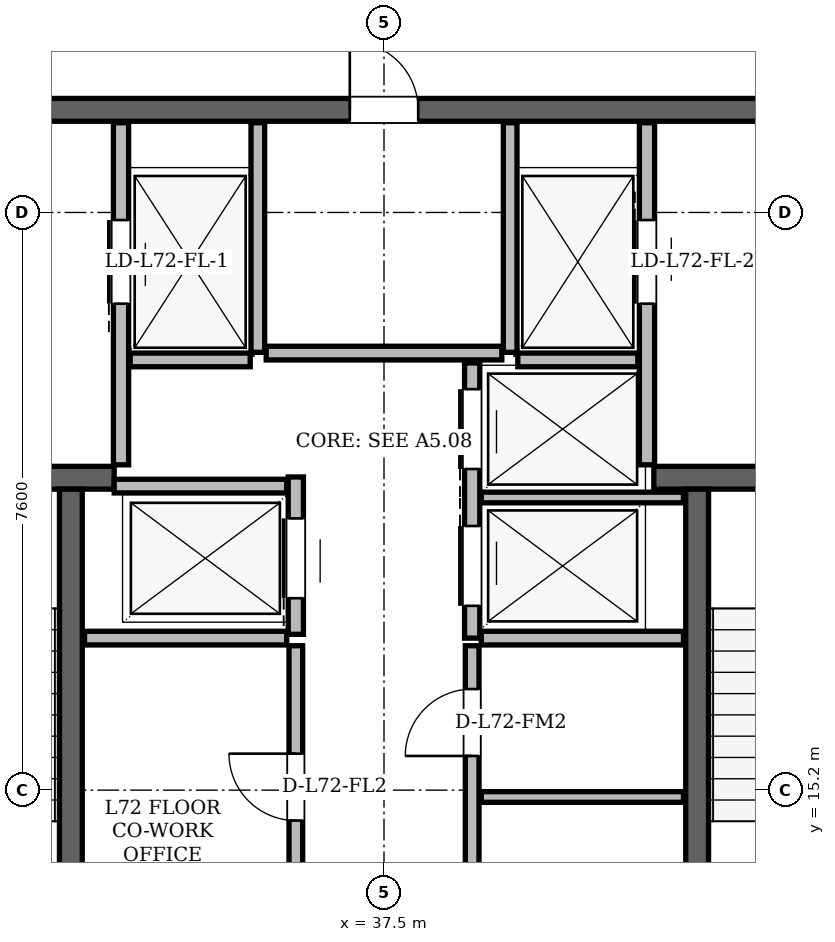
"""IFC4 building model, lengths in metres.
Left out: names, types, materials, properties, quantities, classifications, styles, units other than length and angle.
Written with IfcOpenShell. Run it as: python <this file> out.ifc"""

import sys

from ifc_helpers import new_model, si_unit, direction, frame, frame_2d, origin, place, context, subcontext, project, spatial, rectangle, extrude, element, fill, save


model = new_model("IFC4")
c1 = context("Model", 3, precision=1e-05, world=origin(), true_north=direction((0.0, 1.0)))
c2 = subcontext(c1, "Body", "Model", "MODEL_VIEW")
j1 = project(units=[si_unit("LENGTHUNIT", "METRE"), si_unit("PLANEANGLEUNIT", "RADIAN")], contexts=[c1])
p1 = place(None, origin())
s1 = spatial("IfcSite", under=j1, at=p1, CompositionType="ELEMENT")
p2 = place(p1, origin())
s2 = spatial("IfcBuilding", under=s1, at=p2, CompositionType="ELEMENT")
p3 = place(p2, frame((0.0, 0.0, 273.3)))
s3 = spatial("IfcBuildingStorey", under=s2, at=p3, CompositionType="ELEMENT", Elevation=273.3)
p4 = place(p3, frame((29.65, 24.15, 0.0), z_axis=(0.0, 0.0, 1.0), x_axis=(1.0, 0.0, 0.0)))
e1 = element("IfcWall", 1, at=p4, inside=s3, PredefinedType="SHEAR", context=c2, shape_type="SweptSolid", body=[
    extrude(rectangle(XDim=15.7, YDim=0.3, at=frame_2d((7.85, 0.0))), origin(), (0.0, 0.0, 1.0), 3.68),
])
p5 = place(p4, frame((1.7, 0.0, 0.0)))
e2 = element("IfcOpeningElement", 2, at=p5, cuts=e1, PredefinedType="OPENING", context=c2, shape_type="SweptSolid", body=[
    extrude(rectangle(XDim=1.2, YDim=2.2, at=frame_2d((0.6, 1.1))), frame((0.0, 0.15, 0.0), z_axis=(0.0, -1.0, 0.0), x_axis=(1.0, 0.0, 0.0)), (0.0, 0.0, 1.0), 0.3),
])
p6 = place(p4, frame((12.8, 0.0, 0.0)))
e3 = element("IfcOpeningElement", 3, at=p6, cuts=e1, PredefinedType="OPENING", context=c2, shape_type="SweptSolid", body=[
    extrude(rectangle(XDim=1.2, YDim=2.2, at=frame_2d((0.6, 1.1))), frame((0.0, 0.15, 0.0), z_axis=(0.0, -1.0, 0.0), x_axis=(1.0, 0.0, 0.0)), (0.0, 0.0, 1.0), 0.3),
])
p7 = place(p4, frame((7.4, 0.0, 0.0)))
e4 = element("IfcOpeningElement", 4, at=p7, cuts=e1, PredefinedType="OPENING", context=c2, shape_type="SweptSolid", body=[
    extrude(rectangle(XDim=0.9, YDim=2.05, at=frame_2d((0.45, 1.025))), frame((0.0, 0.15, 0.0), z_axis=(0.0, -1.0, 0.0), x_axis=(1.0, 0.0, 0.0)), (0.0, 0.0, 1.0), 0.3),
])
p8 = place(p3, frame((29.94, 19.31, 0.0), z_axis=(0.0, 0.0, 1.0), x_axis=(1.0, 0.0, 0.0)))
e5 = element("IfcWall", 5, at=p8, inside=s3, PredefinedType="SHEAR", context=c2, shape_type="SweptSolid", body=[
    extrude(rectangle(XDim=4.01, YDim=0.3, at=frame_2d((2.005, 0.0))), origin(), (0.0, 0.0, 1.0), 3.68),
])
p9 = place(p8, frame((1.01, 0.0, 0.0)))
e6 = element("IfcOpeningElement", 6, at=p9, cuts=e5, PredefinedType="OPENING", context=c2, shape_type="SweptSolid", body=[
    extrude(rectangle(XDim=1.4, YDim=2.2, at=frame_2d((0.7, 1.1))), frame((0.0, 0.15, 0.0), z_axis=(0.0, -1.0, 0.0), x_axis=(1.0, 0.0, 0.0)), (0.0, 0.0, 1.0), 0.3),
])
p10 = place(p3, frame((41.05, 19.31, 0.0), z_axis=(0.0, 0.0, 1.0), x_axis=(1.0, 0.0, 0.0)))
e7 = element("IfcWall", 7, at=p10, inside=s3, PredefinedType="SHEAR", context=c2, shape_type="SweptSolid", body=[
    extrude(rectangle(XDim=4.01, YDim=0.3, at=frame_2d((2.005, 0.0))), origin(), (0.0, 0.0, 1.0), 3.68),
])
p11 = place(p10, frame((1.6, 0.0, 0.0)))
e8 = element("IfcOpeningElement", 8, at=p11, cuts=e7, PredefinedType="OPENING", context=c2, shape_type="SweptSolid", body=[
    extrude(rectangle(XDim=1.4, YDim=2.2, at=frame_2d((0.7, 1.1))), frame((0.0, 0.15, 0.0), z_axis=(0.0, -1.0, 0.0), x_axis=(1.0, 0.0, 0.0)), (0.0, 0.0, 1.0), 0.3),
])
for number, where, z_axis, x_axis in (
    (9, (33.38, 11.54, 0.0), (0.0, 0.0, 1.0), (0.0, 1.0, 0.0)),
    (10, (41.62, 11.54, 0.0), (0.0, 0.0, 1.0), (0.0, 1.0, 0.0)),
):
    element("IfcWall", number, at=place(p3, frame(where, z_axis=z_axis, x_axis=x_axis)), inside=s3, PredefinedType="SHEAR", context=c2, shape_type="SweptSolid", body=[
        extrude(rectangle(XDim=7.62, YDim=0.3, at=frame_2d((3.81, 0.0))), origin(), (0.0, 0.0, 1.0), 3.68),
    ])
p12 = place(p3, frame((58.532, 10.683, 0.0), z_axis=(0.0, 0.0, 1.0), x_axis=(-0.499999381892, 0.866025760649, 0.0)))
e11 = element("IfcWall", 11, at=p12, inside=s3, PredefinedType="SOLIDWALL", context=c2, shape_type="SweptSolid", body=[
    extrude(rectangle(XDim=37.343, YDim=0.29, at=frame_2d((18.671, 0.0))), origin(), (0.0, 0.0, 1.0), 3.058),
])
p13 = place(p12, frame((6.789, 0.0, 0.0)))
e12 = element("IfcOpeningElement", 12, at=p13, cuts=e11, PredefinedType="OPENING", context=c2, shape_type="SweptSolid", body=[
    extrude(rectangle(XDim=1.5, YDim=2.2, at=frame_2d((0.75, 1.1))), frame((0.0, 0.145, 0.0), z_axis=(0.0, -1.0, 0.0), x_axis=(1.0, 0.0, 0.0)), (0.0, 0.0, 1.0), 0.29),
])
p14 = place(p12, frame((27.808, 0.0, 0.0)))
e13 = element("IfcOpeningElement", 13, at=p14, cuts=e11, PredefinedType="OPENING", context=c2, shape_type="SweptSolid", body=[
    extrude(rectangle(XDim=1.5, YDim=2.2, at=frame_2d((0.75, 1.1))), frame((0.0, 0.145, 0.0), z_axis=(0.0, -1.0, 0.0), x_axis=(1.0, 0.0, 0.0)), (0.0, 0.0, 1.0), 0.29),
])
p15 = place(p12, frame((0.901, 0.0, 0.85)))
e14 = element("IfcOpeningElement", 14, at=p15, cuts=e11, PredefinedType="OPENING", context=c2, shape_type="SweptSolid", body=[
    extrude(rectangle(XDim=1.2, YDim=1.48, at=frame_2d((0.6, 0.74))), frame((0.0, 0.145, 0.0), z_axis=(0.0, -1.0, 0.0), x_axis=(1.0, 0.0, 0.0)), (0.0, 0.0, 1.0), 0.29),
])
p16 = place(p12, frame((12.688, 0.0, 0.85)))
e15 = element("IfcOpeningElement", 15, at=p16, cuts=e11, PredefinedType="OPENING", context=c2, shape_type="SweptSolid", body=[
    extrude(rectangle(XDim=3.0, YDim=2.098, at=frame_2d((1.5, 1.049))), frame((0.0, 0.145, 0.0), z_axis=(0.0, -1.0, 0.0), x_axis=(1.0, 0.0, 0.0)), (0.0, 0.0, 1.0), 0.29),
])
p17 = place(p12, frame((17.814, 0.0, 0.85)))
e16 = element("IfcOpeningElement", 16, at=p17, cuts=e11, PredefinedType="OPENING", context=c2, shape_type="SweptSolid", body=[
    extrude(rectangle(XDim=2.6, YDim=1.95, at=frame_2d((1.3, 0.975))), frame((0.0, 0.145, 0.0), z_axis=(0.0, -1.0, 0.0), x_axis=(1.0, 0.0, 0.0)), (0.0, 0.0, 1.0), 0.29),
])
p18 = place(p12, frame((35.362, 0.0, 0.85)))
e17 = element("IfcOpeningElement", 17, at=p18, cuts=e11, PredefinedType="OPENING", context=c2, shape_type="SweptSolid", body=[
    extrude(rectangle(XDim=1.2, YDim=1.48, at=frame_2d((0.6, 0.74))), frame((0.0, 0.145, 0.0), z_axis=(0.0, -1.0, 0.0), x_axis=(1.0, 0.0, 0.0)), (0.0, 0.0, 1.0), 0.29),
])
p19 = place(p12, frame((33.788, 0.0, 0.85)))
e18 = element("IfcOpeningElement", 18, at=p19, cuts=e11, PredefinedType="OPENING", context=c2, shape_type="SweptSolid", body=[
    extrude(rectangle(XDim=1.2, YDim=1.48, at=frame_2d((0.6, 0.74))), frame((0.0, 0.145, 0.0), z_axis=(0.0, -1.0, 0.0), x_axis=(1.0, 0.0, 0.0)), (0.0, 0.0, 1.0), 0.29),
])
p20 = place(p12, frame((22.74, 0.0, 0.85)))
e19 = element("IfcOpeningElement", 19, at=p20, cuts=e11, PredefinedType="OPENING", context=c2, shape_type="SweptSolid", body=[
    extrude(rectangle(XDim=1.2, YDim=1.48, at=frame_2d((0.6, 0.74))), frame((0.0, 0.145, 0.0), z_axis=(0.0, -1.0, 0.0), x_axis=(1.0, 0.0, 0.0)), (0.0, 0.0, 1.0), 0.29),
])
p21 = place(p12, frame((31.705, 0.0, 0.85)))
e20 = element("IfcOpeningElement", 20, at=p21, cuts=e11, PredefinedType="OPENING", context=c2, shape_type="SweptSolid", body=[
    extrude(rectangle(XDim=1.2, YDim=1.48, at=frame_2d((0.6, 0.74))), frame((0.0, 0.145, 0.0), z_axis=(0.0, -1.0, 0.0), x_axis=(1.0, 0.0, 0.0)), (0.0, 0.0, 1.0), 0.29),
])
p22 = place(p3, frame((35.139, 43.023, 0.0), z_axis=(0.0, 0.0, 1.0), x_axis=(-0.499999381892, -0.866025760649, 0.0)))
e21 = element("IfcWall", 21, at=p22, inside=s3, PredefinedType="SOLIDWALL", context=c2, shape_type="SweptSolid", body=[
    extrude(rectangle(XDim=37.343, YDim=0.29, at=frame_2d((18.671, 0.0))), origin(), (0.0, 0.0, 1.0), 3.058),
])
p23 = place(p22, frame((3.639, 0.0, 0.0)))
e22 = element("IfcOpeningElement", 22, at=p23, cuts=e21, PredefinedType="OPENING", context=c2, shape_type="SweptSolid", body=[
    extrude(rectangle(XDim=1.5, YDim=2.2, at=frame_2d((0.75, 1.1))), frame((0.0, 0.145, 0.0), z_axis=(0.0, -1.0, 0.0), x_axis=(1.0, 0.0, 0.0)), (0.0, 0.0, 1.0), 0.29),
])
p24 = place(p22, frame((27.809, 0.0, 0.0)))
e23 = element("IfcOpeningElement", 23, at=p24, cuts=e21, PredefinedType="OPENING", context=c2, shape_type="SweptSolid", body=[
    extrude(rectangle(XDim=1.5, YDim=2.2, at=frame_2d((0.75, 1.1))), frame((0.0, 0.145, 0.0), z_axis=(0.0, -1.0, 0.0), x_axis=(1.0, 0.0, 0.0)), (0.0, 0.0, 1.0), 0.29),
])
p25 = place(p22, frame((22.281, 0.0, 0.85)))
e24 = element("IfcOpeningElement", 24, at=p25, cuts=e21, PredefinedType="OPENING", context=c2, shape_type="SweptSolid", body=[
    extrude(rectangle(XDim=2.6, YDim=1.95, at=frame_2d((1.3, 0.975))), frame((0.0, 0.145, 0.0), z_axis=(0.0, -1.0, 0.0), x_axis=(1.0, 0.0, 0.0)), (0.0, 0.0, 1.0), 0.29),
])
p26 = place(p22, frame((33.866, 0.0, 0.85)))
e25 = element("IfcOpeningElement", 25, at=p26, cuts=e21, PredefinedType="OPENING", context=c2, shape_type="SweptSolid", body=[
    extrude(rectangle(XDim=2.4, YDim=1.9, at=frame_2d((1.2, 0.95))), frame((0.0, 0.145, 0.0), z_axis=(0.0, -1.0, 0.0), x_axis=(1.0, 0.0, 0.0)), (0.0, 0.0, 1.0), 0.29),
])
p27 = place(p22, frame((12.197, 0.0, 0.85)))
e26 = element("IfcOpeningElement", 26, at=p27, cuts=e21, PredefinedType="OPENING", context=c2, shape_type="SweptSolid", body=[
    extrude(rectangle(XDim=1.2, YDim=1.48, at=frame_2d((0.6, 0.74))), frame((0.0, 0.145, 0.0), z_axis=(0.0, -1.0, 0.0), x_axis=(1.0, 0.0, 0.0)), (0.0, 0.0, 1.0), 0.29),
])
p28 = place(p22, frame((16.635, 0.0, 0.85)))
e27 = element("IfcOpeningElement", 27, at=p28, cuts=e21, PredefinedType="OPENING", context=c2, shape_type="SweptSolid", body=[
    extrude(rectangle(XDim=1.6, YDim=1.7, at=frame_2d((0.8, 0.85))), frame((0.0, 0.145, 0.0), z_axis=(0.0, -1.0, 0.0), x_axis=(1.0, 0.0, 0.0)), (0.0, 0.0, 1.0), 0.29),
])
p29 = place(p22, frame((7.001, 0.0, 0.85)))
e28 = element("IfcOpeningElement", 28, at=p29, cuts=e21, PredefinedType="OPENING", context=c2, shape_type="SweptSolid", body=[
    extrude(rectangle(XDim=1.2, YDim=1.48, at=frame_2d((0.6, 0.74))), frame((0.0, 0.145, 0.0), z_axis=(0.0, -1.0, 0.0), x_axis=(1.0, 0.0, 0.0)), (0.0, 0.0, 1.0), 0.29),
])
p30 = place(p3, frame((34.04, 19.48, 0.0), z_axis=(0.0, 0.0, 1.0), x_axis=(0.0, 1.0, 0.0)))
e29 = element("IfcWall", 29, at=p30, inside=s3, PredefinedType="PARTITIONING", context=c2, shape_type="SweptSolid", body=[
    extrude(rectangle(XDim=4.5, YDim=0.2, at=frame_2d((2.25, 0.0))), origin(), (0.0, 0.0, 1.0), 3.68),
])
p31 = place(p30, frame((2.12, 0.0, 0.0)))
e30 = element("IfcOpeningElement", 30, at=p31, cuts=e29, PredefinedType="OPENING", context=c2, shape_type="SweptSolid", body=[
    extrude(rectangle(XDim=1.1, YDim=2.2, at=frame_2d((0.55, 1.1))), frame((0.0, 0.1, 0.0), z_axis=(0.0, -1.0, 0.0), x_axis=(1.0, 0.0, 0.0)), (0.0, 0.0, 1.0), 0.2),
])
p32 = place(p3, frame((35.84, 20.96, 0.0), z_axis=(0.0, 0.0, 1.0), x_axis=(0.0, 1.0, 0.0)))
e31 = element("IfcWall", 31, at=p32, inside=s3, PredefinedType="PARTITIONING", context=c2, shape_type="SweptSolid", body=[
    extrude(rectangle(XDim=3.02, YDim=0.18, at=frame_2d((1.51, 0.0))), origin(), (0.0, 0.0, 1.0), 3.68),
])
p33 = place(p3, frame((34.16, 20.86, 0.0), z_axis=(0.0, 0.0, 1.0), x_axis=(1.0, 0.0, 0.0)))
e32 = element("IfcWall", 32, at=p33, inside=s3, PredefinedType="PARTITIONING", context=c2, shape_type="SweptSolid", body=[
    extrude(rectangle(XDim=1.58, YDim=0.18, at=frame_2d((0.79, 0.0))), origin(), (0.0, 0.0, 1.0), 3.68),
])
p34 = place(p3, frame((40.96, 19.48, 0.0), z_axis=(0.0, 0.0, 1.0), x_axis=(0.0, 1.0, 0.0)))
e33 = element("IfcWall", 33, at=p34, inside=s3, PredefinedType="PARTITIONING", context=c2, shape_type="SweptSolid", body=[
    extrude(rectangle(XDim=4.5, YDim=0.2, at=frame_2d((2.25, 0.0))), origin(), (0.0, 0.0, 1.0), 3.68),
])
p35 = place(p34, frame((2.12, 0.0, 0.0)))
e34 = element("IfcOpeningElement", 34, at=p35, cuts=e33, PredefinedType="OPENING", context=c2, shape_type="SweptSolid", body=[
    extrude(rectangle(XDim=1.1, YDim=2.2, at=frame_2d((0.55, 1.1))), frame((0.0, 0.1, 0.0), z_axis=(0.0, -1.0, 0.0), x_axis=(1.0, 0.0, 0.0)), (0.0, 0.0, 1.0), 0.2),
])
p36 = place(p3, frame((39.16, 20.96, 0.0), z_axis=(0.0, 0.0, 1.0), x_axis=(0.0, 1.0, 0.0)))
e35 = element("IfcWall", 35, at=p36, inside=s3, PredefinedType="PARTITIONING", context=c2, shape_type="SweptSolid", body=[
    extrude(rectangle(XDim=3.02, YDim=0.18, at=frame_2d((1.51, 0.0))), origin(), (0.0, 0.0, 1.0), 3.68),
])
p37 = place(p3, frame((39.26, 20.86, 0.0), z_axis=(0.0, 0.0, 1.0), x_axis=(1.0, 0.0, 0.0)))
e36 = element("IfcWall", 36, at=p37, inside=s3, PredefinedType="PARTITIONING", context=c2, shape_type="SweptSolid", body=[
    extrude(rectangle(XDim=1.58, YDim=0.18, at=frame_2d((0.79, 0.0))), origin(), (0.0, 0.0, 1.0), 3.68),
])
p38 = place(p3, frame((36.34, 17.25, 0.0), z_axis=(0.0, 0.0, 1.0), x_axis=(0.0, 1.0, 0.0)))
e37 = element("IfcWall", 37, at=p38, inside=s3, PredefinedType="PARTITIONING", context=c2, shape_type="SweptSolid", body=[
    extrude(rectangle(XDim=2.07, YDim=0.2, at=frame_2d((1.035, 0.0))), origin(), (0.0, 0.0, 1.0), 3.68),
])
p39 = place(p38, frame((0.475, 0.0, 0.0)))
e38 = element("IfcOpeningElement", 38, at=p39, cuts=e37, PredefinedType="OPENING", context=c2, shape_type="SweptSolid", body=[
    extrude(rectangle(XDim=1.05, YDim=2.15, at=frame_2d((0.525, 1.075))), frame((0.0, 0.1, 0.0), z_axis=(0.0, -1.0, 0.0), x_axis=(1.0, 0.0, 0.0)), (0.0, 0.0, 1.0), 0.2),
])
p40 = place(p3, frame((33.95, 19.2, 0.0), z_axis=(0.0, 0.0, 1.0), x_axis=(1.0, 0.0, 0.0)))
e39 = element("IfcWall", 39, at=p40, inside=s3, PredefinedType="PARTITIONING", context=c2, shape_type="SweptSolid", body=[
    extrude(rectangle(XDim=2.27, YDim=0.18, at=frame_2d((1.135, 0.0))), origin(), (0.0, 0.0, 1.0), 3.68),
])
p41 = place(p3, frame((33.56, 17.2, 0.0), z_axis=(0.0, 0.0, 1.0), x_axis=(1.0, 0.0, 0.0)))
e40 = element("IfcWall", 40, at=p41, inside=s3, PredefinedType="PARTITIONING", context=c2, shape_type="SweptSolid", body=[
    extrude(rectangle(XDim=2.66, YDim=0.18, at=frame_2d((1.33, 0.0))), origin(), (0.0, 0.0, 1.0), 3.68),
])
p42 = place(p3, frame((36.34, 11.55, 0.0), z_axis=(0.0, 0.0, 1.0), x_axis=(0.0, 1.0, 0.0)))
e41 = element("IfcWall", 41, at=p42, inside=s3, PredefinedType="PARTITIONING", context=c2, shape_type="SweptSolid", body=[
    extrude(rectangle(XDim=5.55, YDim=0.18, at=frame_2d((2.775, 0.0))), origin(), (0.0, 0.0, 1.0), 3.68),
])
p43 = place(p42, frame((0.55, 0.0, 0.0)))
e42 = element("IfcOpeningElement", 42, at=p43, cuts=e41, PredefinedType="OPENING", context=c2, shape_type="SweptSolid", body=[
    extrude(rectangle(XDim=0.88, YDim=2.08, at=frame_2d((0.44, 1.04))), frame((0.0, 0.09, 0.0), z_axis=(0.0, -1.0, 0.0), x_axis=(1.0, 0.0, 0.0)), (0.0, 0.0, 1.0), 0.18),
])
p44 = place(p42, frame((3.25, 0.0, 0.0)))
e43 = element("IfcOpeningElement", 43, at=p44, cuts=e41, PredefinedType="OPENING", context=c2, shape_type="SweptSolid", body=[
    extrude(rectangle(XDim=0.88, YDim=2.08, at=frame_2d((0.44, 1.04))), frame((0.0, 0.09, 0.0), z_axis=(0.0, -1.0, 0.0), x_axis=(1.0, 0.0, 0.0)), (0.0, 0.0, 1.0), 0.18),
])
p45 = place(p3, frame((38.66, 17.2, 0.0), z_axis=(0.0, 0.0, 1.0), x_axis=(0.0, 1.0, 0.0)))
e44 = element("IfcWall", 44, at=p45, inside=s3, PredefinedType="PARTITIONING", context=c2, shape_type="SweptSolid", body=[
    extrude(rectangle(XDim=3.62, YDim=0.2, at=frame_2d((1.81, 0.0))), origin(), (0.0, 0.0, 1.0), 3.68),
])
p46 = place(p45, frame((0.425, 0.0, 0.0)))
e45 = element("IfcOpeningElement", 45, at=p46, cuts=e44, PredefinedType="OPENING", context=c2, shape_type="SweptSolid", body=[
    extrude(rectangle(XDim=1.05, YDim=2.15, at=frame_2d((0.525, 1.075))), frame((0.0, 0.1, 0.0), z_axis=(0.0, -1.0, 0.0), x_axis=(1.0, 0.0, 0.0)), (0.0, 0.0, 1.0), 0.2),
])
p47 = place(p45, frame((2.225, 0.0, 0.0)))
e46 = element("IfcOpeningElement", 46, at=p47, cuts=e44, PredefinedType="OPENING", context=c2, shape_type="SweptSolid", body=[
    extrude(rectangle(XDim=1.05, YDim=2.15, at=frame_2d((0.525, 1.075))), frame((0.0, 0.1, 0.0), z_axis=(0.0, -1.0, 0.0), x_axis=(1.0, 0.0, 0.0)), (0.0, 0.0, 1.0), 0.2),
])
p48 = place(p3, frame((38.78, 17.2, 0.0), z_axis=(0.0, 0.0, 1.0), x_axis=(1.0, 0.0, 0.0)))
e47 = element("IfcWall", 47, at=p48, inside=s3, PredefinedType="PARTITIONING", context=c2, shape_type="SweptSolid", body=[
    extrude(rectangle(XDim=2.66, YDim=0.18, at=frame_2d((1.33, 0.0))), origin(), (0.0, 0.0, 1.0), 3.68),
])
p49 = place(p3, frame((38.78, 19.05, 0.0), z_axis=(0.0, 0.0, 1.0), x_axis=(1.0, 0.0, 0.0)))
e48 = element("IfcWall", 48, at=p49, inside=s3, PredefinedType="PARTITIONING", context=c2, shape_type="SweptSolid", body=[
    extrude(rectangle(XDim=2.66, YDim=0.14, at=frame_2d((1.33, 0.0))), origin(), (0.0, 0.0, 1.0), 3.68),
])
p50 = place(p3, frame((38.66, 11.55, 0.0), z_axis=(0.0, 0.0, 1.0), x_axis=(0.0, 1.0, 0.0)))
e49 = element("IfcWall", 49, at=p50, inside=s3, PredefinedType="PARTITIONING", context=c2, shape_type="SweptSolid", body=[
    extrude(rectangle(XDim=5.55, YDim=0.18, at=frame_2d((2.775, 0.0))), origin(), (0.0, 0.0, 1.0), 3.68),
])
p51 = place(p50, frame((1.35, 0.0, 0.0)))
e50 = element("IfcOpeningElement", 50, at=p51, cuts=e49, PredefinedType="OPENING", context=c2, shape_type="SweptSolid", body=[
    extrude(rectangle(XDim=0.88, YDim=2.08, at=frame_2d((0.44, 1.04))), frame((0.0, 0.09, 0.0), z_axis=(0.0, -1.0, 0.0), x_axis=(1.0, 0.0, 0.0)), (0.0, 0.0, 1.0), 0.18),
])
p52 = place(p50, frame((4.1, 0.0, 0.0)))
e51 = element("IfcOpeningElement", 51, at=p52, cuts=e49, PredefinedType="OPENING", context=c2, shape_type="SweptSolid", body=[
    extrude(rectangle(XDim=0.88, YDim=2.08, at=frame_2d((0.44, 1.04))), frame((0.0, 0.09, 0.0), z_axis=(0.0, -1.0, 0.0), x_axis=(1.0, 0.0, 0.0)), (0.0, 0.0, 1.0), 0.18),
])
p53 = place(p3, frame((38.78, 15.11, 0.0), z_axis=(0.0, 0.0, 1.0), x_axis=(1.0, 0.0, 0.0)))
e52 = element("IfcWall", 52, at=p53, inside=s3, PredefinedType="PARTITIONING", context=c2, shape_type="SweptSolid", body=[
    extrude(rectangle(XDim=2.66, YDim=0.14, at=frame_2d((1.33, 0.0))), origin(), (0.0, 0.0, 1.0), 3.68),
])
p54 = place(p3, frame((35.95, 20.95, 0.0), z_axis=(0.0, 0.0, 1.0), x_axis=(1.0, 0.0, 0.0)))
e53 = element("IfcWall", 53, at=p54, inside=s3, PredefinedType="PARTITIONING", context=c2, shape_type="SweptSolid", body=[
    extrude(rectangle(XDim=3.1, YDim=0.18, at=frame_2d((1.55, 0.0))), origin(), (0.0, 0.0, 1.0), 3.68),
])
p55 = place(p44, origin())
e54 = element("IfcDoor", 54, at=p55, inside=s3, OperationType="SINGLE_SWING_RIGHT", PredefinedType="DOOR", context=c2, shape_type="SweptSolid", body=[
    extrude(rectangle(XDim=0.88, YDim=2.08, at=frame_2d((0.44, 1.04))), frame((0.0, 0.025, 0.0), z_axis=(0.0, -1.0, 0.0), x_axis=(1.0, 0.0, 0.0)), (0.0, 0.0, 1.0), 0.05),
])
fill(e43, e54)
p56 = place(p52, origin())
e55 = element("IfcDoor", 55, at=p56, inside=s3, OperationType="SINGLE_SWING_LEFT", PredefinedType="DOOR", context=c2, shape_type="SweptSolid", body=[
    extrude(rectangle(XDim=0.88, YDim=2.08, at=frame_2d((0.44, 1.04))), frame((0.0, 0.025, 0.0), z_axis=(0.0, -1.0, 0.0), x_axis=(1.0, 0.0, 0.0)), (0.0, 0.0, 1.0), 0.05),
])
fill(e51, e55)
p57 = place(p31, origin())
e56 = element("IfcDoor", 56, at=p57, inside=s3, OperationType="SLIDING_TO_LEFT", PredefinedType="DOOR", context=c2, shape_type="SweptSolid", body=[
    extrude(rectangle(XDim=1.1, YDim=2.2, at=frame_2d((0.55, 1.1))), frame((0.0, 0.025, 0.0), z_axis=(0.0, -1.0, 0.0), x_axis=(1.0, 0.0, 0.0)), (0.0, 0.0, 1.0), 0.05),
])
fill(e30, e56)
p58 = place(p35, origin())
e57 = element("IfcDoor", 57, at=p58, inside=s3, OperationType="SLIDING_TO_RIGHT", PredefinedType="DOOR", context=c2, shape_type="SweptSolid", body=[
    extrude(rectangle(XDim=1.1, YDim=2.2, at=frame_2d((0.55, 1.1))), frame((0.0, 0.025, 0.0), z_axis=(0.0, -1.0, 0.0), x_axis=(1.0, 0.0, 0.0)), (0.0, 0.0, 1.0), 0.05),
])
fill(e34, e57)
p59 = place(p39, origin())
e58 = element("IfcDoor", 58, at=p59, inside=s3, OperationType="SLIDING_TO_LEFT", PredefinedType="DOOR", context=c2, shape_type="SweptSolid", body=[
    extrude(rectangle(XDim=1.05, YDim=2.15, at=frame_2d((0.525, 1.075))), frame((0.0, 0.025, 0.0), z_axis=(0.0, -1.0, 0.0), x_axis=(1.0, 0.0, 0.0)), (0.0, 0.0, 1.0), 0.05),
])
fill(e38, e58)
p60 = place(p46, origin())
e59 = element("IfcDoor", 59, at=p60, inside=s3, OperationType="SLIDING_TO_RIGHT", PredefinedType="DOOR", context=c2, shape_type="SweptSolid", body=[
    extrude(rectangle(XDim=1.05, YDim=2.15, at=frame_2d((0.525, 1.075))), frame((0.0, 0.025, 0.0), z_axis=(0.0, -1.0, 0.0), x_axis=(1.0, 0.0, 0.0)), (0.0, 0.0, 1.0), 0.05),
])
fill(e45, e59)
p61 = place(p47, origin())
e60 = element("IfcDoor", 60, at=p61, inside=s3, OperationType="SLIDING_TO_LEFT", PredefinedType="DOOR", context=c2, shape_type="SweptSolid", body=[
    extrude(rectangle(XDim=1.05, YDim=2.15, at=frame_2d((0.525, 1.075))), frame((0.0, 0.025, 0.0), z_axis=(0.0, -1.0, 0.0), x_axis=(1.0, 0.0, 0.0)), (0.0, 0.0, 1.0), 0.05),
])
fill(e46, e60)
p62 = place(p7, origin())
e61 = element("IfcDoor", 61, at=p62, inside=s3, OperationType="SINGLE_SWING_LEFT", PredefinedType="DOOR", context=c2, shape_type="SweptSolid", body=[
    extrude(rectangle(XDim=0.9, YDim=2.05, at=frame_2d((0.45, 1.025))), frame((0.0, 0.025, 0.0), z_axis=(0.0, -1.0, 0.0), x_axis=(1.0, 0.0, 0.0)), (0.0, 0.0, 1.0), 0.05),
])
fill(e4, e61)
save(model, sys.argv[1])
